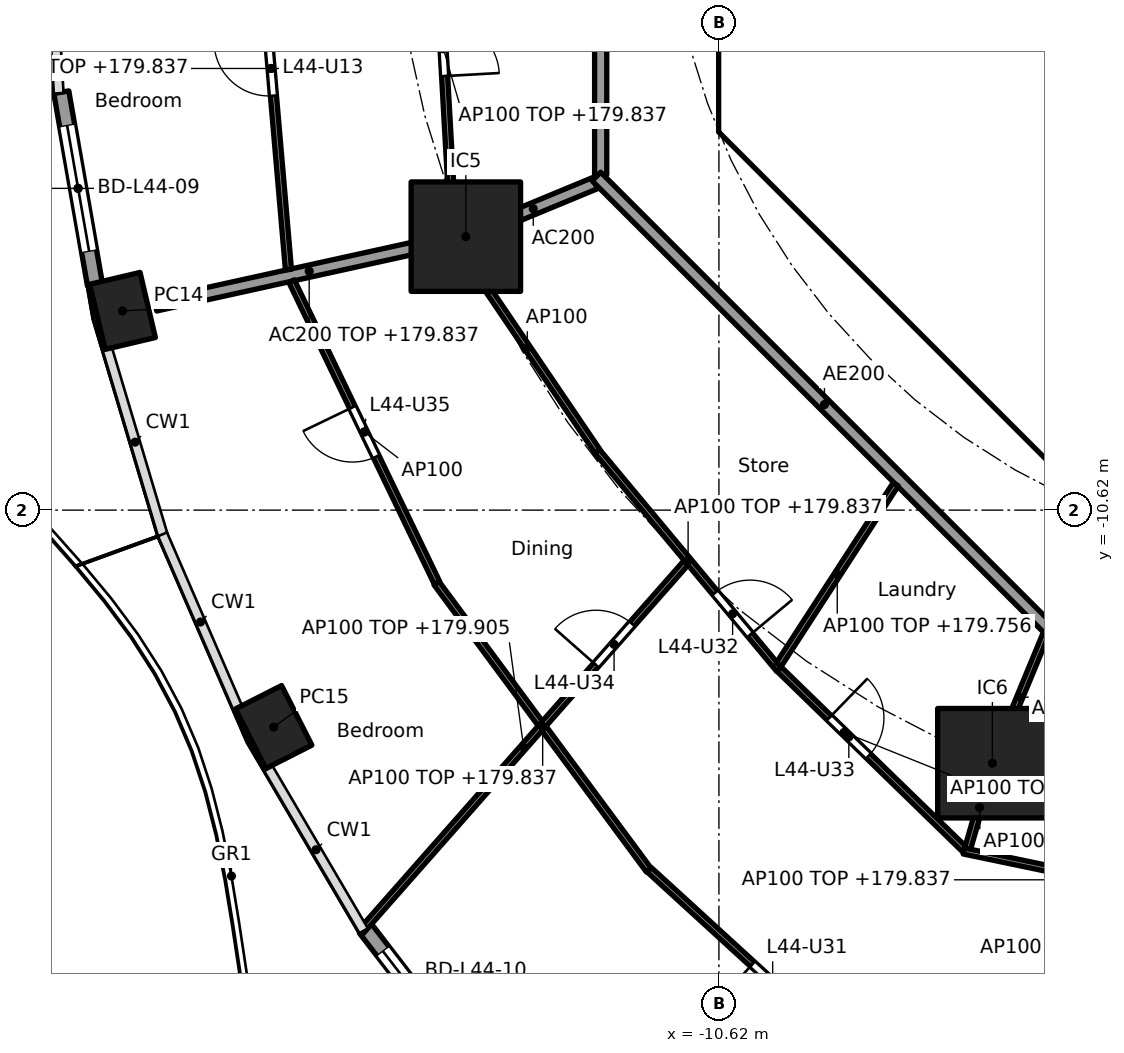
"""IFC4 building model, lengths in metres.
Left out: names, types, materials, properties, quantities, classifications, styles, units other than length and angle.
Written with IfcOpenShell. Run it as: python <this file> out.ifc"""

import sys

from ifc_helpers import new_model, si_unit, direction, frame, frame_2d, origin, origin_2d, place, context, subcontext, project, spatial, polyline, rectangle, hollow_rectangle, outline, extrude, element, fill, save


model = new_model("IFC4")
c1 = context("Model", 3, precision=1e-05, world=origin(), true_north=direction((0.0, 1.0)))
c2 = subcontext(c1, "Body", "Model", "MODEL_VIEW")
j1 = project(units=[si_unit("LENGTHUNIT", "METRE"), si_unit("PLANEANGLEUNIT", "RADIAN")], contexts=[c1])
p1 = place(None, origin())
s1 = spatial("IfcSite", under=j1, at=p1, CompositionType="ELEMENT")
p2 = place(p1, origin())
s2 = spatial("IfcBuilding", under=s1, at=p2, CompositionType="ELEMENT")
p3 = place(p2, frame((0.0, 0.0, 177.0)))
s3 = spatial("IfcBuildingStorey", under=s2, at=p3, CompositionType="ELEMENT", Elevation=177.0)
for number, where, z_axis, x_axis in (
    (1, (-20.427, -7.344, 0.0), (0.0, 0.0, 1.0), (0.229, -0.973, 0.0)),
    (2, (-17.942, -14.188, 0.0), (0.0, 0.0, 1.0), (0.452, -0.892, 0.0)),
):
    element("IfcColumn", number, at=place(p3, frame(where, z_axis=z_axis, x_axis=x_axis)), inside=s3, PredefinedType="COLUMN", context=c2, shape_type="SweptSolid", body=[
        extrude(hollow_rectangle(XDim=1.1, YDim=0.85, WallThickness=0.036, at=origin_2d()), origin(), (0.0, 0.0, 1.0), 3.7),
    ])
for number, where, z_axis, x_axis in (
    (3, (-14.782, -6.123, 0.0), (0.0, 0.0, 1.0), (1.0, 0.0, 0.0)),
    (4, (-6.123, -14.782, 0.0), (0.0, 0.0, 1.0), (1.0, 0.0, 0.0)),
):
    element("IfcColumn", number, at=place(p3, frame(where, z_axis=z_axis, x_axis=x_axis)), inside=s3, PredefinedType="COLUMN", context=c2, shape_type="SweptSolid", body=[
        extrude(rectangle(XDim=1.8, YDim=1.8, at=origin_2d()), origin(), (0.0, 0.0, 1.0), 3.7),
    ])
p4 = place(p3, frame((-20.882, -6.91, 0.0), z_axis=(0.0, 0.0, 1.0), x_axis=(-0.172223552479, 0.98505789067, 0.0)))
e5 = element("IfcWall", 5, at=p4, inside=s3, PredefinedType="SOLIDWALL", context=c2, shape_type="SweptSolid", body=[
    extrude(rectangle(XDim=3.211, YDim=0.25, at=frame_2d((1.605, 0.0))), origin(), (0.0, 0.0, 1.0), 3.44),
])
p5 = place(p4, frame((0.555, 0.0, 0.0)))
e6 = element("IfcOpeningElement", 6, at=p5, cuts=e5, PredefinedType="OPENING", context=c2, shape_type="SweptSolid", body=[
    extrude(rectangle(XDim=2.1, YDim=2.4, at=frame_2d((1.05, 1.2))), frame((0.0, 0.135, 0.0), z_axis=(0.0, -1.0, 0.0), x_axis=(1.0, 0.0, 0.0)), (0.0, 0.0, 1.0), 0.27),
])
p6 = place(p3, frame((-14.58, -19.906, 0.0), z_axis=(0.0, 0.0, 1.0), x_axis=(-0.610437428894, 0.79206448311, 0.0)))
e7 = element("IfcWall", 7, at=p6, inside=s3, PredefinedType="SOLIDWALL", context=c2, shape_type="SweptSolid", body=[
    extrude(rectangle(XDim=3.035, YDim=0.25, at=frame_2d((1.518, 0.0))), origin(), (0.0, 0.0, 1.0), 3.44),
])
p7 = place(p6, frame((0.468, 0.0, 0.0)))
e8 = element("IfcOpeningElement", 8, at=p7, cuts=e7, PredefinedType="OPENING", context=c2, shape_type="SweptSolid", body=[
    extrude(rectangle(XDim=2.1, YDim=2.4, at=frame_2d((1.05, 1.2))), frame((0.0, 0.135, 0.0), z_axis=(0.0, -1.0, 0.0), x_axis=(1.0, 0.0, 0.0)), (0.0, 0.0, 1.0), 0.27),
])
p8 = place(p3, frame((-10.325, 3.801, 0.0), z_axis=(0.0, 0.0, 1.0), x_axis=(0.0, -1.0, 0.0)))
e9 = element("IfcWall", 9, at=p8, inside=s3, PredefinedType="SHEAR", context=c2, shape_type="SweptSolid", body=[
    extrude(rectangle(XDim=7.602, YDim=0.6, at=frame_2d((3.801, 0.0))), origin(), (0.0, 0.0, 1.0), 3.44),
])
p9 = place(p8, frame((0.651, 0.0, 0.0)))
e10 = element("IfcOpeningElement", 10, at=p9, cuts=e9, PredefinedType="OPENING", context=c2, shape_type="SweptSolid", body=[
    extrude(rectangle(XDim=1.5, YDim=2.1, at=frame_2d((0.75, 1.05))), frame((0.0, 0.31, 0.0), z_axis=(0.0, -1.0, 0.0), x_axis=(1.0, 0.0, 0.0)), (0.0, 0.0, 1.0), 0.62),
])
p10 = place(p8, frame((5.451, 0.0, 0.0)))
e11 = element("IfcOpeningElement", 11, at=p10, cuts=e9, PredefinedType="OPENING", context=c2, shape_type="SweptSolid", body=[
    extrude(rectangle(XDim=1.5, YDim=2.1, at=frame_2d((0.75, 1.05))), frame((0.0, 0.31, 0.0), z_axis=(0.0, -1.0, 0.0), x_axis=(1.0, 0.0, 0.0)), (0.0, 0.0, 1.0), 0.62),
])
p11 = place(p3, frame((-9.988, -4.613, 0.0), z_axis=(0.0, 0.0, 1.0), x_axis=(0.707106781187, -0.707106781187, 0.0)))
e12 = element("IfcWall", 12, at=p11, inside=s3, PredefinedType="SHEAR", context=c2, shape_type="SweptSolid", body=[
    extrude(rectangle(XDim=7.602, YDim=0.6, at=frame_2d((3.801, 0.0))), origin(), (0.0, 0.0, 1.0), 3.44),
])
p12 = place(p11, frame((6.151, 0.0, 0.0)))
e13 = element("IfcOpeningElement", 13, at=p12, cuts=e12, PredefinedType="OPENING", context=c2, shape_type="SweptSolid", body=[
    extrude(rectangle(XDim=1.1, YDim=2.1, at=frame_2d((0.55, 1.05))), frame((0.0, 0.31, 0.0), z_axis=(0.0, -1.0, 0.0), x_axis=(1.0, 0.0, 0.0)), (0.0, 0.0, 1.0), 0.62),
])
p13 = place(p3, frame((-6.2, -7.827, 0.0), z_axis=(0.0, 0.0, 1.0), x_axis=(0.0, 1.0, 0.0)))
e14 = element("IfcWall", 14, at=p13, inside=s3, PredefinedType="PARTITIONING", context=c2, shape_type="SweptSolid", body=[
    extrude(rectangle(XDim=3.527, YDim=0.15, at=frame_2d((1.763, 0.0))), origin(), (0.0, 0.0, 1.0), 3.44),
])
p14 = place(p13, frame((1.276, 0.0, 0.0)))
e15 = element("IfcOpeningElement", 15, at=p14, cuts=e14, PredefinedType="OPENING", context=c2, shape_type="SweptSolid", body=[
    extrude(rectangle(XDim=0.9, YDim=2.1, at=frame_2d((0.45, 1.05))), frame((0.0, 0.085, 0.0), z_axis=(0.0, -1.0, 0.0), x_axis=(1.0, 0.0, 0.0)), (0.0, 0.0, 1.0), 0.17),
])
p15 = place(p3, origin())
e16 = element("IfcWall", 16, at=p15, inside=s3, PredefinedType="SHEAR", context=c2, shape_type="SweptSolid", body=[
    extrude(outline(polyline([(-10.625, -3.801), (-10.025, -3.801), (-10.025, -4.152), (-9.776, -4.401), (-10.2, -4.825), (-10.625, -4.401), (-10.625, -3.801)])), origin(), (0.0, 0.0, 1.0), 3.44),
])
p16 = place(p3, frame((-10.025, -4.0, 0.0), z_axis=(0.0, 0.0, 1.0), x_axis=(1.0, 0.0, 0.0)))
e17 = element("IfcWall", 17, at=p16, inside=s3, PredefinedType="PARTITIONING", context=c2, shape_type="SweptSolid", body=[
    extrude(rectangle(XDim=3.325, YDim=0.2, at=frame_2d((1.662, 0.0))), origin(), (0.0, 0.0, 1.0), 3.44),
])
p17 = place(p3, origin())
e18 = element("IfcWall", 18, at=p17, inside=s3, PredefinedType="SOLIDWALL", context=c2, shape_type="SweptSolid", body=[
    extrude(outline(polyline([(-6.7, -2.1), (-6.5, -2.1), (-6.5, -4.1), (-2.3, -4.1), (-2.3, -2.1), (-2.1, -2.1), (-2.1, -4.1), (-0.1, -4.1), (-0.1, -2.1), (0.1, -2.1), (0.1, -4.1), (2.1, -4.1), (2.1, -2.1), (2.3, -2.1), (2.3, -4.1), (4.3, -4.1), (4.3, -2.1), (4.5, -2.1), (4.5, -4.1), (6.5, -4.1), (6.5, -2.1), (6.7, -2.1), (6.7, -4.3), (-6.7, -4.3), (-6.7, -2.1)])), origin(), (0.0, 0.0, 1.0), 3.44),
])
p18 = place(p3, frame((-12.657, -5.243, 0.0), z_axis=(0.0, 0.0, 1.0), x_axis=(-0.923859888513, -0.38273085373, 0.0)))
e19 = element("IfcWall", 19, at=p18, inside=s3, PredefinedType="PARTITIONING", context=c2, shape_type="SweptSolid", body=[
    extrude(rectangle(XDim=2.199, YDim=0.2, at=frame_2d((1.1, 0.0))), origin(), (0.0, 0.0, 1.0), 3.44),
])
p19 = place(p3, frame((-14.831, -6.134, 0.0), z_axis=(0.0, 0.0, 1.0), x_axis=(-0.976568396888, -0.215207263354, 0.0)))
e20 = element("IfcWall", 20, at=p19, inside=s3, PredefinedType="PARTITIONING", context=c2, shape_type="SweptSolid", body=[
    extrude(rectangle(XDim=5.177, YDim=0.2, at=frame_2d((2.588, 0.0))), origin(), (0.0, 0.0, 1.0), 2.837),
])
p20 = place(p3, frame((-12.565, 5.304, 0.0), z_axis=(0.0, 0.0, 1.0), x_axis=(0.0, -1.0, 0.0)))
e21 = element("IfcWall", 21, at=p20, inside=s3, PredefinedType="PARTITIONING", context=c2, shape_type="SweptSolid", body=[
    extrude(rectangle(XDim=10.409, YDim=0.2, at=frame_2d((5.205, 0.0))), origin(), (0.0, 0.0, 1.0), 3.44),
])
p21 = place(p3, frame((-12.635, -5.134, 0.0), z_axis=(0.0, 0.0, 1.0), x_axis=(0.707106781187, -0.707106781187, 0.0)))
e22 = element("IfcWall", 22, at=p21, inside=s3, PredefinedType="PARTITIONING", context=c2, shape_type="SweptSolid", body=[
    extrude(rectangle(XDim=10.609, YDim=0.2, at=frame_2d((5.305, 0.0))), origin(), (0.0, 0.0, 1.0), 3.44),
])
p22 = place(p3, frame((-15.331, 0.05, 0.0), z_axis=(0.0, 0.0, 1.0), x_axis=(0.056310939406, -0.998413280212, 0.0)))
e23 = element("IfcWall", 23, at=p22, inside=s3, PredefinedType="PARTITIONING", context=c2, shape_type="SweptSolid", body=[
    extrude(rectangle(XDim=6.126, YDim=0.1, at=frame_2d((3.063, 0.0))), origin(), (0.0, 0.0, 1.0), 2.837),
])
p23 = place(p22, frame((2.638, 0.0, 0.0)))
e24 = element("IfcOpeningElement", 24, at=p23, cuts=e23, PredefinedType="OPENING", context=c2, shape_type="SweptSolid", body=[
    extrude(rectangle(XDim=0.9, YDim=2.1, at=frame_2d((0.45, 1.05))), frame((0.0, 0.06, 0.0), z_axis=(0.0, -1.0, 0.0), x_axis=(1.0, 0.0, 0.0)), (0.0, 0.0, 1.0), 0.12),
])
p24 = place(p3, frame((-18.271, -0.05, 0.0), z_axis=(0.0, 0.0, 1.0), x_axis=(0.086012321907, -0.996294073294, 0.0)))
e25 = element("IfcWall", 25, at=p24, inside=s3, PredefinedType="PARTITIONING", context=c2, shape_type="SweptSolid", body=[
    extrude(rectangle(XDim=6.639, YDim=0.1, at=frame_2d((3.32, 0.0))), origin(), (0.0, 0.0, 1.0), 2.837),
])
p25 = place(p24, frame((2.87, 0.0, 0.0)))
e26 = element("IfcOpeningElement", 26, at=p25, cuts=e25, PredefinedType="OPENING", context=c2, shape_type="SweptSolid", body=[
    extrude(rectangle(XDim=0.9, YDim=2.1, at=frame_2d((0.45, 1.05))), frame((0.0, 0.06, 0.0), z_axis=(0.0, -1.0, 0.0), x_axis=(1.0, 0.0, 0.0)), (0.0, 0.0, 1.0), 0.12),
])
p26 = place(p3, frame((-14.924, -6.249, 0.0), z_axis=(0.0, 0.0, 1.0), x_axis=(0.561046521684, -0.82778427172, 0.0)))
e27 = element("IfcWall", 27, at=p26, inside=s3, PredefinedType="PARTITIONING", context=c2, shape_type="SweptSolid", body=[
    extrude(rectangle(XDim=4.109, YDim=0.1, at=frame_2d((2.054, 0.0))), origin(), (0.0, 0.0, 1.0), 3.44),
])
p27 = place(p3, frame((-17.647, -6.854, 0.0), z_axis=(0.0, 0.0, 1.0), x_axis=(0.434027506504, -0.900899619046, 0.0)))
e28 = element("IfcWall", 28, at=p27, inside=s3, PredefinedType="PARTITIONING", context=c2, shape_type="SweptSolid", body=[
    extrude(rectangle(XDim=5.508, YDim=0.1, at=frame_2d((2.754, 0.0))), origin(), (0.0, 0.0, 1.0), 3.44),
])
p28 = place(p27, frame((2.304, 0.0, 0.0)))
e29 = element("IfcOpeningElement", 29, at=p28, cuts=e28, PredefinedType="OPENING", context=c2, shape_type="SweptSolid", body=[
    extrude(rectangle(XDim=0.9, YDim=2.1, at=frame_2d((0.45, 1.05))), frame((0.0, 0.06, 0.0), z_axis=(0.0, -1.0, 0.0), x_axis=(1.0, 0.0, 0.0)), (0.0, 0.0, 1.0), 0.12),
])
p29 = place(p3, frame((-12.623, -9.653, 0.0), z_axis=(0.0, 0.0, 1.0), x_axis=(0.640297481347, -0.768127030758, 0.0)))
e30 = element("IfcWall", 30, at=p29, inside=s3, PredefinedType="PARTITIONING", context=c2, shape_type="SweptSolid", body=[
    extrude(rectangle(XDim=4.672, YDim=0.1, at=frame_2d((2.336, 0.0))), origin(), (0.0, 0.0, 1.0), 2.837),
])
p30 = place(p29, frame((3.029, 0.0, 0.0)))
e31 = element("IfcOpeningElement", 31, at=p30, cuts=e30, PredefinedType="OPENING", context=c2, shape_type="SweptSolid", body=[
    extrude(rectangle(XDim=0.9, YDim=2.1, at=frame_2d((0.45, 1.05))), frame((0.0, 0.06, 0.0), z_axis=(0.0, -1.0, 0.0), x_axis=(1.0, 0.0, 0.0)), (0.0, 0.0, 1.0), 0.12),
])
p31 = place(p3, frame((-15.265, -11.821, 0.0), z_axis=(0.0, 0.0, 1.0), x_axis=(0.594711348772, -0.803939308432, 0.0)))
e32 = element("IfcWall", 32, at=p31, inside=s3, PredefinedType="PARTITIONING", context=c2, shape_type="SweptSolid", body=[
    extrude(rectangle(XDim=5.872, YDim=0.1, at=frame_2d((2.936, 0.0))), origin(), (0.0, 0.0, 1.0), 2.837),
])
p32 = place(p3, frame((-11.16, -11.485, 0.0), z_axis=(0.0, 0.0, 1.0), x_axis=(-0.661275898802, -0.750142776852, 0.0)))
e33 = element("IfcWall", 33, at=p32, inside=s3, PredefinedType="PARTITIONING", context=c2, shape_type="SweptSolid", body=[
    extrude(rectangle(XDim=8.083, YDim=0.1, at=frame_2d((4.041, 0.0))), origin(), (0.0, 0.0, 1.0), 2.905),
])
p33 = place(p32, frame((1.341, 0.0, 0.0)))
e34 = element("IfcOpeningElement", 34, at=p33, cuts=e33, PredefinedType="OPENING", context=c2, shape_type="SweptSolid", body=[
    extrude(rectangle(XDim=0.9, YDim=2.1, at=frame_2d((0.45, 1.05))), frame((0.0, 0.06, 0.0), z_axis=(0.0, -1.0, 0.0), x_axis=(1.0, 0.0, 0.0)), (0.0, 0.0, 1.0), 0.12),
])
p34 = place(p3, frame((-7.712, -10.195, 0.0), z_axis=(0.0, 0.0, 1.0), x_axis=(-0.544170086001, -0.838974920663, 0.0)))
e35 = element("IfcWall", 35, at=p34, inside=s3, PredefinedType="PARTITIONING", context=c2, shape_type="SweptSolid", body=[
    extrude(rectangle(XDim=3.535, YDim=0.1, at=frame_2d((1.768, 0.0))), origin(), (0.0, 0.0, 1.0), 2.756),
])
p35 = place(p3, frame((-9.627, -13.238, 0.0), z_axis=(0.0, 0.0, 1.0), x_axis=(0.716946269374, -0.697128429223, 0.0)))
e36 = element("IfcWall", 36, at=p35, inside=s3, PredefinedType="PARTITIONING", context=c2, shape_type="SweptSolid", body=[
    extrude(rectangle(XDim=4.25, YDim=0.1, at=frame_2d((2.125, 0.0))), origin(), (0.0, 0.0, 1.0), 2.837),
])
p36 = place(p35, frame((1.145, 0.0, 0.0)))
e37 = element("IfcOpeningElement", 37, at=p36, cuts=e36, PredefinedType="OPENING", context=c2, shape_type="SweptSolid", body=[
    extrude(rectangle(XDim=0.9, YDim=2.1, at=frame_2d((0.45, 1.05))), frame((0.0, 0.06, 0.0), z_axis=(0.0, -1.0, 0.0), x_axis=(1.0, 0.0, 0.0)), (0.0, 0.0, 1.0), 0.12),
])
p37 = place(p3, frame((-11.766, -16.535, 0.0), z_axis=(0.0, 0.0, 1.0), x_axis=(0.738053852169, -0.674741810842, 0.0)))
e38 = element("IfcWall", 38, at=p37, inside=s3, PredefinedType="PARTITIONING", context=c2, shape_type="SweptSolid", body=[
    extrude(rectangle(XDim=5.549, YDim=0.1, at=frame_2d((2.774, 0.0))), origin(), (0.0, 0.0, 1.0), 2.837),
])
p38 = place(p37, frame((2.3, 0.0, 0.0)))
e39 = element("IfcOpeningElement", 39, at=p38, cuts=e38, PredefinedType="OPENING", context=c2, shape_type="SweptSolid", body=[
    extrude(rectangle(XDim=0.9, YDim=2.1, at=frame_2d((0.45, 1.05))), frame((0.0, 0.06, 0.0), z_axis=(0.0, -1.0, 0.0), x_axis=(1.0, 0.0, 0.0)), (0.0, 0.0, 1.0), 0.12),
])
p39 = place(p3, frame((-5.243, -12.657, 0.0), z_axis=(0.0, 0.0, 1.0), x_axis=(-0.382719158442, -0.923864733477, 0.0)))
e40 = element("IfcWall", 40, at=p39, inside=s3, PredefinedType="PARTITIONING", context=c2, shape_type="SweptSolid", body=[
    extrude(rectangle(XDim=2.25, YDim=0.1, at=frame_2d((1.125, 0.0))), origin(), (0.0, 0.0, 1.0), 3.44),
])
p40 = place(p3, frame((-6.137, -14.831, 0.0), z_axis=(0.0, 0.0, 1.0), x_axis=(-0.2785069197, -0.960434222464, 0.0)))
e41 = element("IfcWall", 41, at=p40, inside=s3, PredefinedType="PARTITIONING", context=c2, shape_type="SweptSolid", body=[
    extrude(rectangle(XDim=1.413, YDim=0.1, at=frame_2d((0.707, 0.0))), origin(), (0.0, 0.0, 1.0), 3.44),
])
p41 = place(p3, frame((-6.594, -16.226, 0.0), z_axis=(0.0, 0.0, 1.0), x_axis=(0.978899284405, -0.204343316484, 0.0)))
e42 = element("IfcWall", 42, at=p41, inside=s3, PredefinedType="PARTITIONING", context=c2, shape_type="SweptSolid", body=[
    extrude(rectangle(XDim=4.636, YDim=0.1, at=frame_2d((2.318, 0.0))), origin(), (0.0, 0.0, 1.0), 2.837),
])
p42 = place(p41, frame((3.002, 0.0, 0.0)))
e43 = element("IfcOpeningElement", 43, at=p42, cuts=e42, PredefinedType="OPENING", context=c2, shape_type="SweptSolid", body=[
    extrude(rectangle(XDim=0.9, YDim=2.1, at=frame_2d((0.45, 1.05))), frame((0.0, 0.06, 0.0), z_axis=(0.0, -1.0, 0.0), x_axis=(1.0, 0.0, 0.0)), (0.0, 0.0, 1.0), 0.12),
])
p43 = place(p5, origin())
e44 = element("IfcDoor", 44, at=p43, inside=s3, OperationType="SLIDING_TO_LEFT", PredefinedType="DOOR", context=c2, shape_type="SweptSolid", body=[
    extrude(rectangle(XDim=2.1, YDim=2.4, at=frame_2d((1.05, 1.2))), frame((0.0, 0.025, 0.0), z_axis=(0.0, -1.0, 0.0), x_axis=(1.0, 0.0, 0.0)), (0.0, 0.0, 1.0), 0.05),
])
fill(e6, e44)
p44 = place(p7, origin())
e45 = element("IfcDoor", 45, at=p44, inside=s3, OperationType="SLIDING_TO_LEFT", PredefinedType="DOOR", context=c2, shape_type="SweptSolid", body=[
    extrude(rectangle(XDim=2.1, YDim=2.4, at=frame_2d((1.05, 1.2))), frame((0.0, 0.025, 0.0), z_axis=(0.0, -1.0, 0.0), x_axis=(1.0, 0.0, 0.0)), (0.0, 0.0, 1.0), 0.05),
])
fill(e8, e45)
p45 = place(p14, origin())
e46 = element("IfcDoor", 46, at=p45, inside=s3, OperationType="SINGLE_SWING_LEFT", PredefinedType="DOOR", context=c2, shape_type="SweptSolid", body=[
    extrude(rectangle(XDim=0.9, YDim=2.1, at=frame_2d((0.45, 1.05))), frame((0.0, 0.025, 0.0), z_axis=(0.0, -1.0, 0.0), x_axis=(1.0, 0.0, 0.0)), (0.0, 0.0, 1.0), 0.05),
])
fill(e15, e46)
p46 = place(p10, origin())
e47 = element("IfcDoor", 47, at=p46, inside=s3, OperationType="DOUBLE_DOOR_SINGLE_SWING", PredefinedType="DOOR", context=c2, shape_type="SweptSolid", body=[
    extrude(rectangle(XDim=1.5, YDim=2.1, at=frame_2d((0.75, 1.05))), frame((0.0, 0.025, 0.0), z_axis=(0.0, -1.0, 0.0), x_axis=(1.0, 0.0, 0.0)), (0.0, 0.0, 1.0), 0.05),
])
fill(e11, e47)
p47 = place(p12, origin())
e48 = element("IfcDoor", 48, at=p47, inside=s3, OperationType="SINGLE_SWING_LEFT", PredefinedType="DOOR", context=c2, shape_type="SweptSolid", body=[
    extrude(rectangle(XDim=1.1, YDim=2.1, at=frame_2d((0.55, 1.05))), frame((0.0, 0.025, 0.0), z_axis=(0.0, -1.0, 0.0), x_axis=(1.0, 0.0, 0.0)), (0.0, 0.0, 1.0), 0.05),
])
fill(e13, e48)
p48 = place(p25, frame((0.9, 0.0, 0.0), x_axis=(-1.0, 0.0, 0.0)))
e49 = element("IfcDoor", 49, at=p48, inside=s3, OperationType="SINGLE_SWING_RIGHT", PredefinedType="DOOR", context=c2, shape_type="SweptSolid", body=[
    extrude(rectangle(XDim=0.9, YDim=2.1, at=frame_2d((0.45, 1.05))), frame((0.0, 0.025, 0.0), z_axis=(0.0, -1.0, 0.0), x_axis=(1.0, 0.0, 0.0)), (0.0, 0.0, 1.0), 0.05),
])
fill(e26, e49)
p49 = place(p23, origin())
e50 = element("IfcDoor", 50, at=p49, inside=s3, OperationType="SINGLE_SWING_RIGHT", PredefinedType="DOOR", context=c2, shape_type="SweptSolid", body=[
    extrude(rectangle(XDim=0.9, YDim=2.1, at=frame_2d((0.45, 1.05))), frame((0.0, 0.025, 0.0), z_axis=(0.0, -1.0, 0.0), x_axis=(1.0, 0.0, 0.0)), (0.0, 0.0, 1.0), 0.05),
])
fill(e24, e50)
p50 = place(p38, frame((0.9, 0.0, 0.0), x_axis=(-1.0, 0.0, 0.0)))
e51 = element("IfcDoor", 51, at=p50, inside=s3, OperationType="SINGLE_SWING_RIGHT", PredefinedType="DOOR", context=c2, shape_type="SweptSolid", body=[
    extrude(rectangle(XDim=0.9, YDim=2.1, at=frame_2d((0.45, 1.05))), frame((0.0, 0.025, 0.0), z_axis=(0.0, -1.0, 0.0), x_axis=(1.0, 0.0, 0.0)), (0.0, 0.0, 1.0), 0.05),
])
fill(e39, e51)
p51 = place(p30, origin())
e52 = element("IfcDoor", 52, at=p51, inside=s3, OperationType="SINGLE_SWING_RIGHT", PredefinedType="DOOR", context=c2, shape_type="SweptSolid", body=[
    extrude(rectangle(XDim=0.9, YDim=2.1, at=frame_2d((0.45, 1.05))), frame((0.0, 0.025, 0.0), z_axis=(0.0, -1.0, 0.0), x_axis=(1.0, 0.0, 0.0)), (0.0, 0.0, 1.0), 0.05),
])
fill(e31, e52)
p52 = place(p36, origin())
e53 = element("IfcDoor", 53, at=p52, inside=s3, OperationType="SINGLE_SWING_LEFT", PredefinedType="DOOR", context=c2, shape_type="SweptSolid", body=[
    extrude(rectangle(XDim=0.9, YDim=2.1, at=frame_2d((0.45, 1.05))), frame((0.0, 0.025, 0.0), z_axis=(0.0, -1.0, 0.0), x_axis=(1.0, 0.0, 0.0)), (0.0, 0.0, 1.0), 0.05),
])
fill(e37, e53)
p53 = place(p33, frame((0.9, 0.0, 0.0), x_axis=(-1.0, 0.0, 0.0)))
e54 = element("IfcDoor", 54, at=p53, inside=s3, OperationType="SINGLE_SWING_LEFT", PredefinedType="DOOR", context=c2, shape_type="SweptSolid", body=[
    extrude(rectangle(XDim=0.9, YDim=2.1, at=frame_2d((0.45, 1.05))), frame((0.0, 0.025, 0.0), z_axis=(0.0, -1.0, 0.0), x_axis=(1.0, 0.0, 0.0)), (0.0, 0.0, 1.0), 0.05),
])
fill(e34, e54)
p54 = place(p28, frame((0.9, 0.0, 0.0), x_axis=(-1.0, 0.0, 0.0)))
e55 = element("IfcDoor", 55, at=p54, inside=s3, OperationType="SINGLE_SWING_RIGHT", PredefinedType="DOOR", context=c2, shape_type="SweptSolid", body=[
    extrude(rectangle(XDim=0.9, YDim=2.1, at=frame_2d((0.45, 1.05))), frame((0.0, 0.025, 0.0), z_axis=(0.0, -1.0, 0.0), x_axis=(1.0, 0.0, 0.0)), (0.0, 0.0, 1.0), 0.05),
])
fill(e29, e55)
save(model, sys.argv[1])
